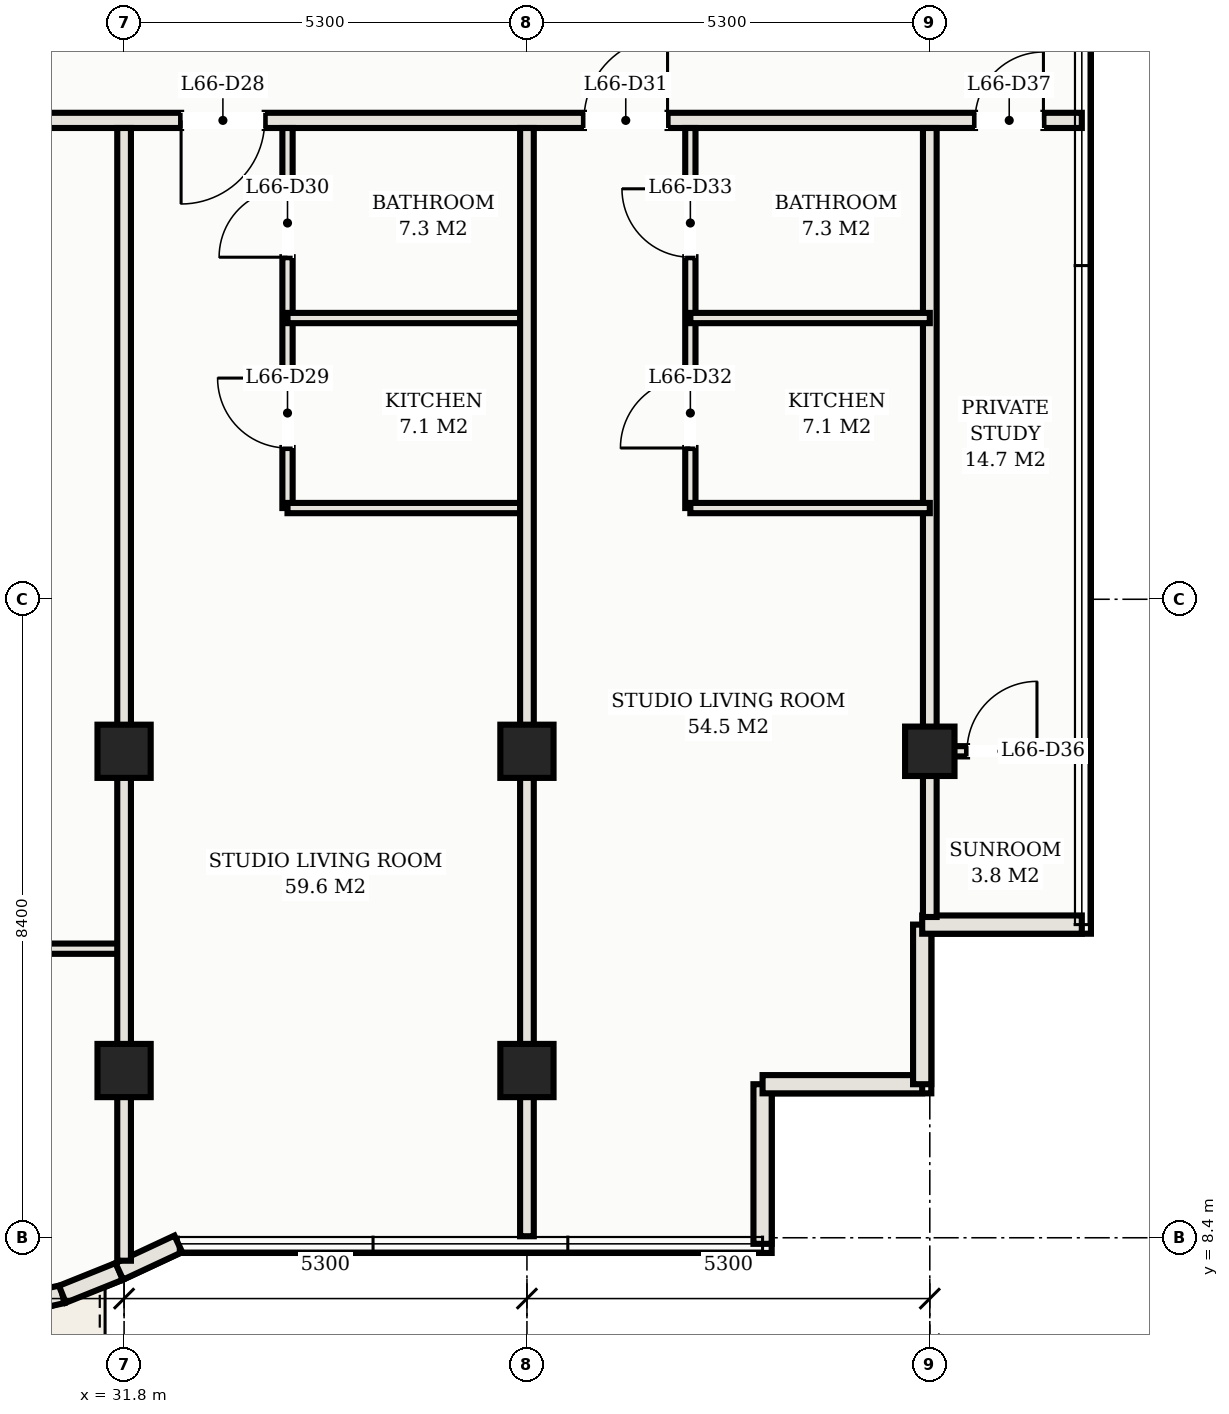
"""IFC4 building model, lengths in metres.
Left out: names, types, materials, properties, quantities, classifications, styles, units other than length and angle.
Written with IfcOpenShell. Run it as: python <this file> out.ifc"""

import sys

from ifc_helpers import new_model, si_unit, direction, frame, frame_2d, origin, origin_2d, place, context, subcontext, project, spatial, rectangle, hollow_rectangle, extrude, element, fill, save


model = new_model("IFC4")
c1 = context("Model", 3, precision=1e-05, world=origin(), true_north=direction((0.0, 1.0)))
c2 = subcontext(c1, "Body", "Model", "MODEL_VIEW")
j1 = project(units=[si_unit("LENGTHUNIT", "METRE"), si_unit("PLANEANGLEUNIT", "RADIAN")], contexts=[c1])
p1 = place(None, origin())
s1 = spatial("IfcSite", under=j1, at=p1, CompositionType="ELEMENT")
p2 = place(p1, origin())
s2 = spatial("IfcBuilding", under=s1, at=p2, CompositionType="ELEMENT")
p3 = place(p2, frame((0.0, 0.0, 239.6)))
s3 = spatial("IfcBuildingStorey", under=s2, at=p3, CompositionType="ELEMENT", Elevation=239.6)
for number, where, z_axis, x_axis in (
    (1, (31.8, 14.8, 0.0), (0.0, 0.0, 1.0), (1.0, 0.0, 0.0)),
    (2, (31.8, 10.6, 0.0), (0.0, 0.0, 1.0), (1.0, 0.0, 0.0)),
    (3, (37.1, 14.8, 0.0), (0.0, 0.0, 1.0), (1.0, 0.0, 0.0)),
    (4, (37.1, 10.6, 0.0), (0.0, 0.0, 1.0), (1.0, 0.0, 0.0)),
):
    element("IfcColumn", number, at=place(p3, frame(where, z_axis=z_axis, x_axis=x_axis)), inside=s3, PredefinedType="COLUMN", context=c2, shape_type="SweptSolid", body=[
        extrude(hollow_rectangle(XDim=0.7, YDim=0.7, WallThickness=0.025, at=origin_2d()), origin(), (0.0, 0.0, 1.0), 3.3),
    ])
p4 = place(p3, frame((42.4, 14.8, 0.0), z_axis=(0.0, 0.0, 1.0), x_axis=(1.0, 0.0, 0.0)))
e5 = element("IfcColumn", 5, at=p4, inside=s3, PredefinedType="COLUMN", context=c2, shape_type="SweptSolid", body=[
    extrude(hollow_rectangle(XDim=0.65, YDim=0.65, WallThickness=0.022, at=origin_2d()), origin(), (0.0, 0.0, 1.0), 3.3),
])
p5 = place(p3, frame((27.248, 6.843, 0.0), z_axis=(0.0, 0.0, 1.0), x_axis=(0.977126252677, 0.212660025225, 0.0)))
e6 = element("IfcWall", 6, at=p5, inside=s3, PredefinedType="SOLIDWALL", context=c2, shape_type="SweptSolid", body=[
    extrude(rectangle(XDim=3.828, YDim=0.24, at=frame_2d((1.914, 0.0))), origin(), (0.0, 0.0, 1.0), 3.11),
])
p6 = place(p5, frame((1.014, 0.0, 0.0)))
e7 = element("IfcOpeningElement", 7, at=p6, cuts=e6, PredefinedType="OPENING", context=c2, shape_type="SweptSolid", body=[
    extrude(rectangle(XDim=1.8, YDim=2.2, at=frame_2d((0.9, 1.1))), frame((0.0, 0.13, 0.0), z_axis=(0.0, -1.0, 0.0), x_axis=(1.0, 0.0, 0.0)), (0.0, 0.0, 1.0), 0.26),
])
p7 = place(p3, frame((30.988, 7.657, 0.0), z_axis=(0.0, 0.0, 1.0), x_axis=(0.927870589467, 0.372902358805, 0.0)))
e8 = element("IfcWall", 8, at=p7, inside=s3, PredefinedType="SOLIDWALL", context=c2, shape_type="SweptSolid", body=[
    extrude(rectangle(XDim=0.807, YDim=0.24, at=frame_2d((0.404, 0.0))), origin(), (0.0, 0.0, 1.0), 3.11),
])
p8 = place(p3, frame((31.737, 7.958, 0.0), z_axis=(0.0, 0.0, 1.0), x_axis=(0.906190424584, 0.422869855147, 0.0)))
e9 = element("IfcWall", 9, at=p8, inside=s3, PredefinedType="SOLIDWALL", context=c2, shape_type="SweptSolid", body=[
    extrude(rectangle(XDim=0.856, YDim=0.24, at=frame_2d((0.428, 0.0))), origin(), (0.0, 0.0, 1.0), 3.11),
])
p9 = place(p3, frame((40.2, 8.32, 0.0), z_axis=(0.0, 0.0, 1.0), x_axis=(0.0, 1.0, 0.0)))
e10 = element("IfcWall", 10, at=p9, inside=s3, PredefinedType="SOLIDWALL", context=c2, shape_type="SweptSolid", body=[
    extrude(rectangle(XDim=2.1, YDim=0.24, at=frame_2d((1.05, 0.0))), origin(), (0.0, 0.0, 1.0), 3.11),
])
for number, where, z_axis, x_axis in (
    (11, (40.2, 10.42, 0.0), (0.0, 0.0, 1.0), (1.0, 0.0, 0.0)),
    (12, (42.3, 10.42, 0.0), (0.0, 0.0, 1.0), (0.0, 1.0, 0.0)),
):
    element("IfcWall", number, at=place(p3, frame(where, z_axis=z_axis, x_axis=x_axis)), inside=s3, PredefinedType="SOLIDWALL", context=c2, shape_type="SweptSolid", body=[
        extrude(rectangle(XDim=2.1, YDim=0.24, at=frame_2d((1.05, 0.0))), origin(), (0.0, 0.0, 1.0), 3.11),
    ])
p10 = place(p3, frame((42.3, 12.52, 0.0), z_axis=(0.0, 0.0, 1.0), x_axis=(1.0, 0.0, 0.0)))
e13 = element("IfcWall", 13, at=p10, inside=s3, PredefinedType="SOLIDWALL", context=c2, shape_type="SweptSolid", body=[
    extrude(rectangle(XDim=2.1, YDim=0.24, at=frame_2d((1.05, 0.0))), origin(), (0.0, 0.0, 1.0), 3.11),
])
p11 = place(p3, frame((8.6, 23.1, 0.0), z_axis=(0.0, 0.0, 1.0), x_axis=(1.0, 0.0, 0.0)))
e14 = element("IfcWall", 14, at=p11, inside=s3, PredefinedType="PARTITIONING", context=c2, shape_type="SweptSolid", body=[
    extrude(rectangle(XDim=35.8, YDim=0.2, at=frame_2d((17.9, 0.0))), origin(), (0.0, 0.0, 1.0), 2.45),
])
p12 = place(p11, frame((2.75, 0.0, 0.0)))
e15 = element("IfcOpeningElement", 15, at=p12, cuts=e14, PredefinedType="OPENING", context=c2, shape_type="SweptSolid", body=[
    extrude(rectangle(XDim=1.1, YDim=2.25, at=frame_2d((0.55, 1.125))), frame((0.0, 0.11, 0.0), z_axis=(0.0, -1.0, 0.0), x_axis=(1.0, 0.0, 0.0)), (0.0, 0.0, 1.0), 0.22),
])
p13 = place(p11, frame((13.35, 0.0, 0.0)))
e16 = element("IfcOpeningElement", 16, at=p13, cuts=e14, PredefinedType="OPENING", context=c2, shape_type="SweptSolid", body=[
    extrude(rectangle(XDim=1.1, YDim=2.25, at=frame_2d((0.55, 1.125))), frame((0.0, 0.11, 0.0), z_axis=(0.0, -1.0, 0.0), x_axis=(1.0, 0.0, 0.0)), (0.0, 0.0, 1.0), 0.22),
])
p14 = place(p11, frame((23.95, 0.0, 0.0)))
e17 = element("IfcOpeningElement", 17, at=p14, cuts=e14, PredefinedType="OPENING", context=c2, shape_type="SweptSolid", body=[
    extrude(rectangle(XDim=1.1, YDim=2.25, at=frame_2d((0.55, 1.125))), frame((0.0, 0.11, 0.0), z_axis=(0.0, -1.0, 0.0), x_axis=(1.0, 0.0, 0.0)), (0.0, 0.0, 1.0), 0.22),
])
p15 = place(p11, frame((29.25, 0.0, 0.0)))
e18 = element("IfcOpeningElement", 18, at=p15, cuts=e14, PredefinedType="OPENING", context=c2, shape_type="SweptSolid", body=[
    extrude(rectangle(XDim=1.1, YDim=2.25, at=frame_2d((0.55, 1.125))), frame((0.0, 0.11, 0.0), z_axis=(0.0, -1.0, 0.0), x_axis=(1.0, 0.0, 0.0)), (0.0, 0.0, 1.0), 0.22),
])
p16 = place(p11, frame((0.505, 0.0, 0.0)))
e19 = element("IfcOpeningElement", 19, at=p16, cuts=e14, PredefinedType="OPENING", context=c2, shape_type="SweptSolid", body=[
    extrude(rectangle(XDim=0.9, YDim=2.15, at=frame_2d((0.45, 1.075))), frame((0.0, 0.11, 0.0), z_axis=(0.0, -1.0, 0.0), x_axis=(1.0, 0.0, 0.0)), (0.0, 0.0, 1.0), 0.22),
])
p17 = place(p11, frame((34.395, 0.0, 0.0)))
e20 = element("IfcOpeningElement", 20, at=p17, cuts=e14, PredefinedType="OPENING", context=c2, shape_type="SweptSolid", body=[
    extrude(rectangle(XDim=0.9, YDim=2.15, at=frame_2d((0.45, 1.075))), frame((0.0, 0.11, 0.0), z_axis=(0.0, -1.0, 0.0), x_axis=(1.0, 0.0, 0.0)), (0.0, 0.0, 1.0), 0.22),
])
p18 = place(p3, frame((42.4, 12.62, 0.0), z_axis=(0.0, 0.0, 1.0), x_axis=(0.0, 1.0, 0.0)))
e21 = element("IfcWall", 21, at=p18, inside=s3, PredefinedType="PARTITIONING", context=c2, shape_type="SweptSolid", body=[
    extrude(rectangle(XDim=10.38, YDim=0.18, at=frame_2d((5.19, 0.0))), origin(), (0.0, 0.0, 1.0), 2.45),
])
p19 = place(p3, frame((21.2, 12.203, 0.0), z_axis=(0.0, 0.0, 1.0), x_axis=(1.0, 0.0, 0.0)))
e22 = element("IfcWall", 22, at=p19, inside=s3, PredefinedType="PARTITIONING", context=c2, shape_type="SweptSolid", body=[
    extrude(rectangle(XDim=10.6, YDim=0.135, at=frame_2d((5.3, 0.0))), origin(), (0.0, 0.0, 1.0), 2.45),
])
p20 = place(p19, frame((0.615, 0.0, 0.0)))
e23 = element("IfcOpeningElement", 23, at=p20, cuts=e22, PredefinedType="OPENING", context=c2, shape_type="SweptSolid", body=[
    extrude(rectangle(XDim=0.92, YDim=2.15, at=frame_2d((0.46, 1.075))), frame((0.0, 0.078, 0.0), z_axis=(0.0, -1.0, 0.0), x_axis=(1.0, 0.0, 0.0)), (0.0, 0.0, 1.0), 0.155),
])
p21 = place(p3, frame((31.8, 8.098, 0.0), z_axis=(0.0, 0.0, 1.0), x_axis=(0.0, 1.0, 0.0)))
e24 = element("IfcWall", 24, at=p21, inside=s3, PredefinedType="PARTITIONING", context=c2, shape_type="SweptSolid", body=[
    extrude(rectangle(XDim=14.902, YDim=0.18, at=frame_2d((7.451, 0.0))), origin(), (0.0, 0.0, 1.0), 2.45),
])
p22 = place(p3, frame((33.95, 18.0, 0.0), z_axis=(0.0, 0.0, 1.0), x_axis=(0.0, 1.0, 0.0)))
e25 = element("IfcWall", 25, at=p22, inside=s3, PredefinedType="PARTITIONING", context=c2, shape_type="SweptSolid", body=[
    extrude(rectangle(XDim=5.0, YDim=0.135, at=frame_2d((2.5, 0.0))), origin(), (0.0, 0.0, 1.0), 2.45),
])
p23 = place(p22, frame((0.79, 0.0, 0.0)))
e26 = element("IfcOpeningElement", 26, at=p23, cuts=e25, PredefinedType="OPENING", context=c2, shape_type="SweptSolid", body=[
    extrude(rectangle(XDim=0.92, YDim=2.15, at=frame_2d((0.46, 1.075))), frame((0.0, 0.078, 0.0), z_axis=(0.0, -1.0, 0.0), x_axis=(1.0, 0.0, 0.0)), (0.0, 0.0, 1.0), 0.155),
])
p24 = place(p22, frame((3.3, 0.0, 0.0)))
e27 = element("IfcOpeningElement", 27, at=p24, cuts=e25, PredefinedType="OPENING", context=c2, shape_type="SweptSolid", body=[
    extrude(rectangle(XDim=0.9, YDim=2.15, at=frame_2d((0.45, 1.075))), frame((0.0, 0.078, 0.0), z_axis=(0.0, -1.0, 0.0), x_axis=(1.0, 0.0, 0.0)), (0.0, 0.0, 1.0), 0.155),
])
for number, where, z_axis, x_axis in (
    (28, (33.95, 18.0, 0.0), (0.0, 0.0, 1.0), (1.0, 0.0, 0.0)),
    (29, (33.95, 20.5, 0.0), (0.0, 0.0, 1.0), (1.0, 0.0, 0.0)),
):
    element("IfcWall", number, at=place(p3, frame(where, z_axis=z_axis, x_axis=x_axis)), inside=s3, PredefinedType="PARTITIONING", context=c2, shape_type="SweptSolid", body=[
        extrude(rectangle(XDim=3.15, YDim=0.135, at=frame_2d((1.575, 0.0))), origin(), (0.0, 0.0, 1.0), 2.45),
    ])
p25 = place(p3, frame((37.1, 8.42, 0.0), z_axis=(0.0, 0.0, 1.0), x_axis=(0.0, 1.0, 0.0)))
e30 = element("IfcWall", 30, at=p25, inside=s3, PredefinedType="PARTITIONING", context=c2, shape_type="SweptSolid", body=[
    extrude(rectangle(XDim=14.58, YDim=0.18, at=frame_2d((7.29, 0.0))), origin(), (0.0, 0.0, 1.0), 2.45),
])
p26 = place(p3, frame((39.25, 18.0, 0.0), z_axis=(0.0, 0.0, 1.0), x_axis=(0.0, 1.0, 0.0)))
e31 = element("IfcWall", 31, at=p26, inside=s3, PredefinedType="PARTITIONING", context=c2, shape_type="SweptSolid", body=[
    extrude(rectangle(XDim=5.0, YDim=0.135, at=frame_2d((2.5, 0.0))), origin(), (0.0, 0.0, 1.0), 2.45),
])
p27 = place(p26, frame((0.79, 0.0, 0.0)))
e32 = element("IfcOpeningElement", 32, at=p27, cuts=e31, PredefinedType="OPENING", context=c2, shape_type="SweptSolid", body=[
    extrude(rectangle(XDim=0.92, YDim=2.15, at=frame_2d((0.46, 1.075))), frame((0.0, 0.078, 0.0), z_axis=(0.0, -1.0, 0.0), x_axis=(1.0, 0.0, 0.0)), (0.0, 0.0, 1.0), 0.155),
])
p28 = place(p26, frame((3.3, 0.0, 0.0)))
e33 = element("IfcOpeningElement", 33, at=p28, cuts=e31, PredefinedType="OPENING", context=c2, shape_type="SweptSolid", body=[
    extrude(rectangle(XDim=0.9, YDim=2.15, at=frame_2d((0.45, 1.075))), frame((0.0, 0.078, 0.0), z_axis=(0.0, -1.0, 0.0), x_axis=(1.0, 0.0, 0.0)), (0.0, 0.0, 1.0), 0.155),
])
for number, where, z_axis, x_axis in (
    (34, (39.25, 18.0, 0.0), (0.0, 0.0, 1.0), (1.0, 0.0, 0.0)),
    (35, (39.25, 20.5, 0.0), (0.0, 0.0, 1.0), (1.0, 0.0, 0.0)),
):
    element("IfcWall", number, at=place(p3, frame(where, z_axis=z_axis, x_axis=x_axis)), inside=s3, PredefinedType="PARTITIONING", context=c2, shape_type="SweptSolid", body=[
        extrude(rectangle(XDim=3.15, YDim=0.135, at=frame_2d((1.575, 0.0))), origin(), (0.0, 0.0, 1.0), 2.45),
    ])
p29 = place(p3, frame((42.4, 14.8, 0.0), z_axis=(0.0, 0.0, 1.0), x_axis=(1.0, 0.0, 0.0)))
e36 = element("IfcWall", 36, at=p29, inside=s3, PredefinedType="PARTITIONING", context=c2, shape_type="SweptSolid", body=[
    extrude(rectangle(XDim=1.9, YDim=0.135, at=frame_2d((0.95, 0.0))), origin(), (0.0, 0.0, 1.0), 2.45),
])
p30 = place(p29, frame((0.49, 0.0, 0.0)))
e37 = element("IfcOpeningElement", 37, at=p30, cuts=e36, PredefinedType="OPENING", context=c2, shape_type="SweptSolid", body=[
    extrude(rectangle(XDim=0.92, YDim=2.15, at=frame_2d((0.46, 1.075))), frame((0.0, 0.078, 0.0), z_axis=(0.0, -1.0, 0.0), x_axis=(1.0, 0.0, 0.0)), (0.0, 0.0, 1.0), 0.155),
])
p31 = place(p14, frame((1.1, 0.0, 0.0), z_axis=(0.0, 0.0, 1.0), x_axis=(-1.0, 0.0, 0.0)))
e38 = element("IfcDoor", 38, at=p31, inside=s3, OperationType="SINGLE_SWING_RIGHT", PredefinedType="DOOR", context=c2, shape_type="SweptSolid", body=[
    extrude(rectangle(XDim=1.1, YDim=2.25, at=frame_2d((0.55, 1.125))), frame((0.0, 0.025, 0.0), z_axis=(0.0, -1.0, 0.0), x_axis=(1.0, 0.0, 0.0)), (0.0, 0.0, 1.0), 0.05),
])
fill(e17, e38)
p32 = place(p23, origin())
e39 = element("IfcDoor", 39, at=p32, inside=s3, OperationType="SINGLE_SWING_RIGHT", PredefinedType="DOOR", context=c2, shape_type="SweptSolid", body=[
    extrude(rectangle(XDim=0.92, YDim=2.15, at=frame_2d((0.46, 1.075))), frame((0.0, 0.025, 0.0), z_axis=(0.0, -1.0, 0.0), x_axis=(1.0, 0.0, 0.0)), (0.0, 0.0, 1.0), 0.05),
])
fill(e26, e39)
p33 = place(p24, origin())
e40 = element("IfcDoor", 40, at=p33, inside=s3, OperationType="SINGLE_SWING_LEFT", PredefinedType="DOOR", context=c2, shape_type="SweptSolid", body=[
    extrude(rectangle(XDim=0.9, YDim=2.15, at=frame_2d((0.45, 1.075))), frame((0.0, 0.025, 0.0), z_axis=(0.0, -1.0, 0.0), x_axis=(1.0, 0.0, 0.0)), (0.0, 0.0, 1.0), 0.05),
])
fill(e27, e40)
p34 = place(p15, origin())
e41 = element("IfcDoor", 41, at=p34, inside=s3, OperationType="SINGLE_SWING_RIGHT", PredefinedType="DOOR", context=c2, shape_type="SweptSolid", body=[
    extrude(rectangle(XDim=1.1, YDim=2.25, at=frame_2d((0.55, 1.125))), frame((0.0, 0.025, 0.0), z_axis=(0.0, -1.0, 0.0), x_axis=(1.0, 0.0, 0.0)), (0.0, 0.0, 1.0), 0.05),
])
fill(e18, e41)
p35 = place(p27, origin())
e42 = element("IfcDoor", 42, at=p35, inside=s3, OperationType="SINGLE_SWING_LEFT", PredefinedType="DOOR", context=c2, shape_type="SweptSolid", body=[
    extrude(rectangle(XDim=0.92, YDim=2.15, at=frame_2d((0.46, 1.075))), frame((0.0, 0.025, 0.0), z_axis=(0.0, -1.0, 0.0), x_axis=(1.0, 0.0, 0.0)), (0.0, 0.0, 1.0), 0.05),
])
fill(e32, e42)
p36 = place(p28, origin())
e43 = element("IfcDoor", 43, at=p36, inside=s3, OperationType="SINGLE_SWING_RIGHT", PredefinedType="DOOR", context=c2, shape_type="SweptSolid", body=[
    extrude(rectangle(XDim=0.9, YDim=2.15, at=frame_2d((0.45, 1.075))), frame((0.0, 0.025, 0.0), z_axis=(0.0, -1.0, 0.0), x_axis=(1.0, 0.0, 0.0)), (0.0, 0.0, 1.0), 0.05),
])
fill(e33, e43)
p37 = place(p30, origin())
e44 = element("IfcDoor", 44, at=p37, inside=s3, OperationType="SINGLE_SWING_RIGHT", PredefinedType="DOOR", context=c2, shape_type="SweptSolid", body=[
    extrude(rectangle(XDim=0.92, YDim=2.15, at=frame_2d((0.46, 1.075))), frame((0.0, 0.025, 0.0), z_axis=(0.0, -1.0, 0.0), x_axis=(1.0, 0.0, 0.0)), (0.0, 0.0, 1.0), 0.05),
])
fill(e37, e44)
p38 = place(p17, origin())
e45 = element("IfcDoor", 45, at=p38, inside=s3, OperationType="SINGLE_SWING_RIGHT", PredefinedType="DOOR", context=c2, shape_type="SweptSolid", body=[
    extrude(rectangle(XDim=0.9, YDim=2.15, at=frame_2d((0.45, 1.075))), frame((0.0, 0.025, 0.0), z_axis=(0.0, -1.0, 0.0), x_axis=(1.0, 0.0, 0.0)), (0.0, 0.0, 1.0), 0.05),
])
fill(e20, e45)
save(model, sys.argv[1])
